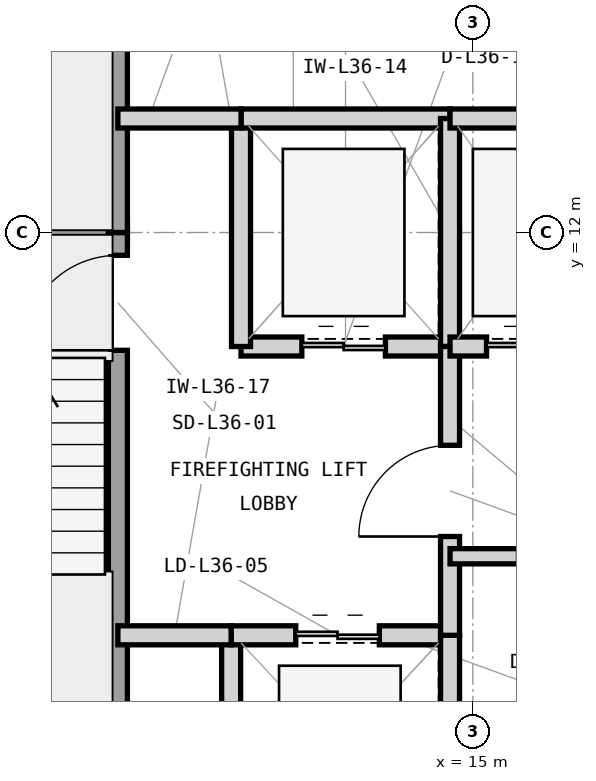
"""IFC4 building model, lengths in metres.
Left out: names, types, materials, properties, quantities, classifications, styles, units other than length and angle.
Written with IfcOpenShell. Run it as: python <this file> out.ifc"""

import sys

from ifc_helpers import new_model, si_unit, direction, frame, frame_2d, origin, place, context, subcontext, project, spatial, rectangle, extrude, element, fill, save


model = new_model("IFC4")
c1 = context("Model", 3, precision=1e-05, world=origin(), true_north=direction((0.0, 1.0)))
c2 = subcontext(c1, "Body", "Model", "MODEL_VIEW")
j1 = project(units=[si_unit("LENGTHUNIT", "METRE"), si_unit("PLANEANGLEUNIT", "RADIAN")], contexts=[c1])
p1 = place(None, origin())
s1 = spatial("IfcSite", under=j1, at=p1, CompositionType="ELEMENT")
p2 = place(p1, origin())
s2 = spatial("IfcBuilding", under=s1, at=p2, CompositionType="ELEMENT")
p3 = place(p2, frame((0.0, 0.0, 151.8)))
s3 = spatial("IfcBuildingStorey", under=s2, at=p3, CompositionType="ELEMENT", Elevation=151.8)
p4 = place(p3, frame((6.35, 12.0, 0.0), z_axis=(0.0, 0.0, 1.0), x_axis=(1.0, 0.0, 0.0)))
e1 = element("IfcWall", 1, at=p4, inside=s3, PredefinedType="SHEAR", context=c2, shape_type="SweptSolid", body=[
    extrude(rectangle(XDim=4.105, YDim=0.25, at=frame_2d((2.052, 0.0))), origin(), (0.0, 0.0, 1.0), 3.9),
])
p5 = place(p3, frame((10.33, 4.55, 0.0), z_axis=(0.0, 0.0, 1.0), x_axis=(0.0, 1.0, 0.0)))
e2 = element("IfcWall", 2, at=p5, inside=s3, PredefinedType="SHEAR", context=c2, shape_type="SweptSolid", body=[
    extrude(rectangle(XDim=7.45, YDim=0.25, at=frame_2d((3.725, 0.0))), origin(), (0.0, 0.0, 1.0), 3.9),
])
p6 = place(p5, frame((5.9, 0.0, 0.0)))
e3 = element("IfcOpeningElement", 3, at=p6, cuts=e2, PredefinedType="OPENING", context=c2, shape_type="SweptSolid", body=[
    extrude(rectangle(XDim=1.25, YDim=2.2, at=frame_2d((0.625, 1.1))), frame((0.0, 0.135, 0.0), z_axis=(0.0, -1.0, 0.0), x_axis=(1.0, 0.0, 0.0)), (0.0, 0.0, 1.0), 0.27),
])
p7 = place(p3, frame((10.33, 12.0, 0.0), z_axis=(0.0, 0.0, 1.0), x_axis=(0.0, 1.0, 0.0)))
e4 = element("IfcWall", 4, at=p7, inside=s3, PredefinedType="SHEAR", context=c2, shape_type="SweptSolid", body=[
    extrude(rectangle(XDim=7.45, YDim=0.25, at=frame_2d((3.725, 0.0))), origin(), (0.0, 0.0, 1.0), 3.9),
])
p8 = place(p7, frame((5.85, 0.0, 0.0)))
e5 = element("IfcOpeningElement", 5, at=p8, cuts=e4, PredefinedType="OPENING", context=c2, shape_type="SweptSolid", body=[
    extrude(rectangle(XDim=1.25, YDim=2.2, at=frame_2d((0.625, 1.1))), frame((0.0, 0.135, 0.0), z_axis=(0.0, -1.0, 0.0), x_axis=(1.0, 0.0, 0.0)), (0.0, 0.0, 1.0), 0.27),
])
p9 = place(p3, frame((11.82, 3.35, 0.0), z_axis=(0.0, 0.0, 1.0), x_axis=(0.0, 1.0, 0.0)))
e6 = element("IfcWall", 6, at=p9, inside=s3, PredefinedType="PARTITIONING", context=c2, shape_type="SweptSolid", body=[
    extrude(rectangle(XDim=3.35, YDim=0.25, at=frame_2d((1.675, 0.0))), origin(), (0.0, 0.0, 1.0), 3.61),
])
p10 = place(p3, frame((11.82, 6.7, 0.0), z_axis=(0.0, 0.0, 1.0), x_axis=(1.0, 0.0, 0.0)))
e7 = element("IfcWall", 7, at=p10, inside=s3, PredefinedType="PARTITIONING", context=c2, shape_type="SweptSolid", body=[
    extrude(rectangle(XDim=2.88, YDim=0.25, at=frame_2d((1.44, 0.0))), origin(), (0.0, 0.0, 1.0), 3.066),
])
p11 = place(p10, frame((0.85, 0.0, 0.0)))
e8 = element("IfcOpeningElement", 8, at=p11, cuts=e7, PredefinedType="OPENING", context=c2, shape_type="SweptSolid", body=[
    extrude(rectangle(XDim=1.1, YDim=2.25, at=frame_2d((0.55, 1.125))), frame((0.0, 0.135, 0.0), z_axis=(0.0, -1.0, 0.0), x_axis=(1.0, 0.0, 0.0)), (0.0, 0.0, 1.0), 0.27),
])
p12 = place(p3, frame((14.7, 3.35, 0.0), z_axis=(0.0, 0.0, 1.0), x_axis=(0.0, 1.0, 0.0)))
e9 = element("IfcWall", 9, at=p12, inside=s3, PredefinedType="PARTITIONING", context=c2, shape_type="SweptSolid", body=[
    extrude(rectangle(XDim=3.35, YDim=0.25, at=frame_2d((1.675, 0.0))), origin(), (0.0, 0.0, 1.0), 3.61),
])
p13 = place(p3, frame((11.95, 10.5, 0.0), z_axis=(0.0, 0.0, 1.0), x_axis=(1.0, 0.0, 0.0)))
e10 = element("IfcWall", 10, at=p13, inside=s3, PredefinedType="PARTITIONING", context=c2, shape_type="SweptSolid", body=[
    extrude(rectangle(XDim=2.75, YDim=0.25, at=frame_2d((1.375, 0.0))), origin(), (0.0, 0.0, 1.0), 3.066),
])
p14 = place(p13, frame((0.8, 0.0, 0.0)))
e11 = element("IfcOpeningElement", 11, at=p14, cuts=e10, PredefinedType="OPENING", context=c2, shape_type="SweptSolid", body=[
    extrude(rectangle(XDim=1.1, YDim=2.25, at=frame_2d((0.55, 1.125))), frame((0.0, 0.135, 0.0), z_axis=(0.0, -1.0, 0.0), x_axis=(1.0, 0.0, 0.0)), (0.0, 0.0, 1.0), 0.27),
])
p15 = place(p3, frame((11.95, 10.5, 0.0), z_axis=(0.0, 0.0, 1.0), x_axis=(0.0, 1.0, 0.0)))
e12 = element("IfcWall", 12, at=p15, inside=s3, PredefinedType="PARTITIONING", context=c2, shape_type="SweptSolid", body=[
    extrude(rectangle(XDim=3.0, YDim=0.25, at=frame_2d((1.5, 0.0))), origin(), (0.0, 0.0, 1.0), 3.61),
])
p16 = place(p3, frame((11.95, 13.5, 0.0), z_axis=(0.0, 0.0, 1.0), x_axis=(1.0, 0.0, 0.0)))
e13 = element("IfcWall", 13, at=p16, inside=s3, PredefinedType="PARTITIONING", context=c2, shape_type="SweptSolid", body=[
    extrude(rectangle(XDim=2.75, YDim=0.25, at=frame_2d((1.375, 0.0))), origin(), (0.0, 0.0, 1.0), 3.066),
])
p17 = place(p3, frame((14.7, 10.5, 0.0), z_axis=(0.0, 0.0, 1.0), x_axis=(0.0, 1.0, 0.0)))
e14 = element("IfcWall", 14, at=p17, inside=s3, PredefinedType="PARTITIONING", context=c2, shape_type="SweptSolid", body=[
    extrude(rectangle(XDim=3.0, YDim=0.25, at=frame_2d((1.5, 0.0))), origin(), (0.0, 0.0, 1.0), 3.61),
])
p18 = place(p3, frame((14.7, 6.7, 0.0), z_axis=(0.0, 0.0, 1.0), x_axis=(0.0, 1.0, 0.0)))
e15 = element("IfcWall", 15, at=p18, inside=s3, PredefinedType="PARTITIONING", context=c2, shape_type="SweptSolid", body=[
    extrude(rectangle(XDim=3.8, YDim=0.25, at=frame_2d((1.9, 0.0))), origin(), (0.0, 0.0, 1.0), 3.61),
])
p19 = place(p18, frame((1.3, 0.0, 0.0)))
e16 = element("IfcOpeningElement", 16, at=p19, cuts=e15, PredefinedType="OPENING", context=c2, shape_type="SweptSolid", body=[
    extrude(rectangle(XDim=1.2, YDim=2.2, at=frame_2d((0.6, 1.1))), frame((0.0, 0.135, 0.0), z_axis=(0.0, -1.0, 0.0), x_axis=(1.0, 0.0, 0.0)), (0.0, 0.0, 1.0), 0.27),
])
p20 = place(p3, frame((10.33, 13.5, 0.0), z_axis=(0.0, 0.0, 1.0), x_axis=(1.0, 0.0, 0.0)))
e17 = element("IfcWall", 17, at=p20, inside=s3, PredefinedType="PARTITIONING", context=c2, shape_type="SweptSolid", body=[
    extrude(rectangle(XDim=1.62, YDim=0.25, at=frame_2d((0.81, 0.0))), origin(), (0.0, 0.0, 1.0), 3.066),
])
p21 = place(p3, frame((10.33, 6.7, 0.0), z_axis=(0.0, 0.0, 1.0), x_axis=(1.0, 0.0, 0.0)))
e18 = element("IfcWall", 18, at=p21, inside=s3, PredefinedType="PARTITIONING", context=c2, shape_type="SweptSolid", body=[
    extrude(rectangle(XDim=1.49, YDim=0.25, at=frame_2d((0.745, 0.0))), origin(), (0.0, 0.0, 1.0), 3.066),
])
p22 = place(p3, frame((14.7, 7.74, 0.0), z_axis=(0.0, 0.0, 1.0), x_axis=(1.0, 0.0, 0.0)))
e19 = element("IfcWall", 19, at=p22, inside=s3, PredefinedType="PARTITIONING", context=c2, shape_type="SweptSolid", body=[
    extrude(rectangle(XDim=2.8, YDim=0.2, at=frame_2d((1.4, 0.0))), origin(), (0.0, 0.0, 1.0), 3.61),
])
p23 = place(p22, frame((0.9, 0.0, 0.0)))
e20 = element("IfcOpeningElement", 20, at=p23, cuts=e19, PredefinedType="OPENING", context=c2, shape_type="SweptSolid", body=[
    extrude(rectangle(XDim=1.0, YDim=2.15, at=frame_2d((0.5, 1.075))), frame((0.0, 0.11, 0.0), z_axis=(0.0, -1.0, 0.0), x_axis=(1.0, 0.0, 0.0)), (0.0, 0.0, 1.0), 0.22),
])
p24 = place(p3, frame((14.7, 10.5, 0.0), z_axis=(0.0, 0.0, 1.0), x_axis=(1.0, 0.0, 0.0)))
e21 = element("IfcWall", 21, at=p24, inside=s3, PredefinedType="PARTITIONING", context=c2, shape_type="SweptSolid", body=[
    extrude(rectangle(XDim=2.15, YDim=0.25, at=frame_2d((1.075, 0.0))), origin(), (0.0, 0.0, 1.0), 3.066),
])
p25 = place(p24, frame((0.48, 0.0, 0.0)))
e22 = element("IfcOpeningElement", 22, at=p25, cuts=e21, PredefinedType="OPENING", context=c2, shape_type="SweptSolid", body=[
    extrude(rectangle(XDim=1.15, YDim=2.25, at=frame_2d((0.575, 1.125))), frame((0.0, 0.135, 0.0), z_axis=(0.0, -1.0, 0.0), x_axis=(1.0, 0.0, 0.0)), (0.0, 0.0, 1.0), 0.27),
])
p26 = place(p3, frame((14.7, 13.5, 0.0), z_axis=(0.0, 0.0, 1.0), x_axis=(1.0, 0.0, 0.0)))
e23 = element("IfcWall", 23, at=p26, inside=s3, PredefinedType="PARTITIONING", context=c2, shape_type="SweptSolid", body=[
    extrude(rectangle(XDim=8.95, YDim=0.25, at=frame_2d((4.475, 0.0))), origin(), (0.0, 0.0, 1.0), 3.066),
])
p27 = place(p6, origin())
e24 = element("IfcDoor", 24, at=p27, inside=s3, OperationType="SINGLE_SWING_LEFT", PredefinedType="DOOR", context=c2, shape_type="SweptSolid", body=[
    extrude(rectangle(XDim=1.25, YDim=2.2, at=frame_2d((0.625, 1.1))), frame((0.0, 0.025, 0.0), z_axis=(0.0, -1.0, 0.0), x_axis=(1.0, 0.0, 0.0)), (0.0, 0.0, 1.0), 0.05),
])
fill(e3, e24)
p28 = place(p11, origin())
e25 = element("IfcDoor", 25, at=p28, inside=s3, OperationType="DOUBLE_DOOR_SLIDING", PredefinedType="DOOR", context=c2, shape_type="SweptSolid", body=[
    extrude(rectangle(XDim=1.1, YDim=2.25, at=frame_2d((0.55, 1.125))), frame((0.0, 0.025, 0.0), z_axis=(0.0, -1.0, 0.0), x_axis=(1.0, 0.0, 0.0)), (0.0, 0.0, 1.0), 0.05),
])
fill(e8, e25)
p29 = place(p14, origin())
e26 = element("IfcDoor", 26, at=p29, inside=s3, OperationType="DOUBLE_DOOR_SLIDING", PredefinedType="DOOR", context=c2, shape_type="SweptSolid", body=[
    extrude(rectangle(XDim=1.1, YDim=2.25, at=frame_2d((0.55, 1.125))), frame((0.0, 0.025, 0.0), z_axis=(0.0, -1.0, 0.0), x_axis=(1.0, 0.0, 0.0)), (0.0, 0.0, 1.0), 0.05),
])
fill(e11, e26)
p30 = place(p19, origin())
e27 = element("IfcDoor", 27, at=p30, inside=s3, OperationType="SINGLE_SWING_LEFT", PredefinedType="DOOR", context=c2, shape_type="SweptSolid", body=[
    extrude(rectangle(XDim=1.2, YDim=2.2, at=frame_2d((0.6, 1.1))), frame((0.0, 0.025, 0.0), z_axis=(0.0, -1.0, 0.0), x_axis=(1.0, 0.0, 0.0)), (0.0, 0.0, 1.0), 0.05),
])
fill(e16, e27)
p31 = place(p25, origin())
e28 = element("IfcDoor", 28, at=p31, inside=s3, OperationType="DOUBLE_DOOR_SLIDING", PredefinedType="DOOR", context=c2, shape_type="SweptSolid", body=[
    extrude(rectangle(XDim=1.15, YDim=2.25, at=frame_2d((0.575, 1.125))), frame((0.0, 0.025, 0.0), z_axis=(0.0, -1.0, 0.0), x_axis=(1.0, 0.0, 0.0)), (0.0, 0.0, 1.0), 0.05),
])
fill(e22, e28)
save(model, sys.argv[1])
